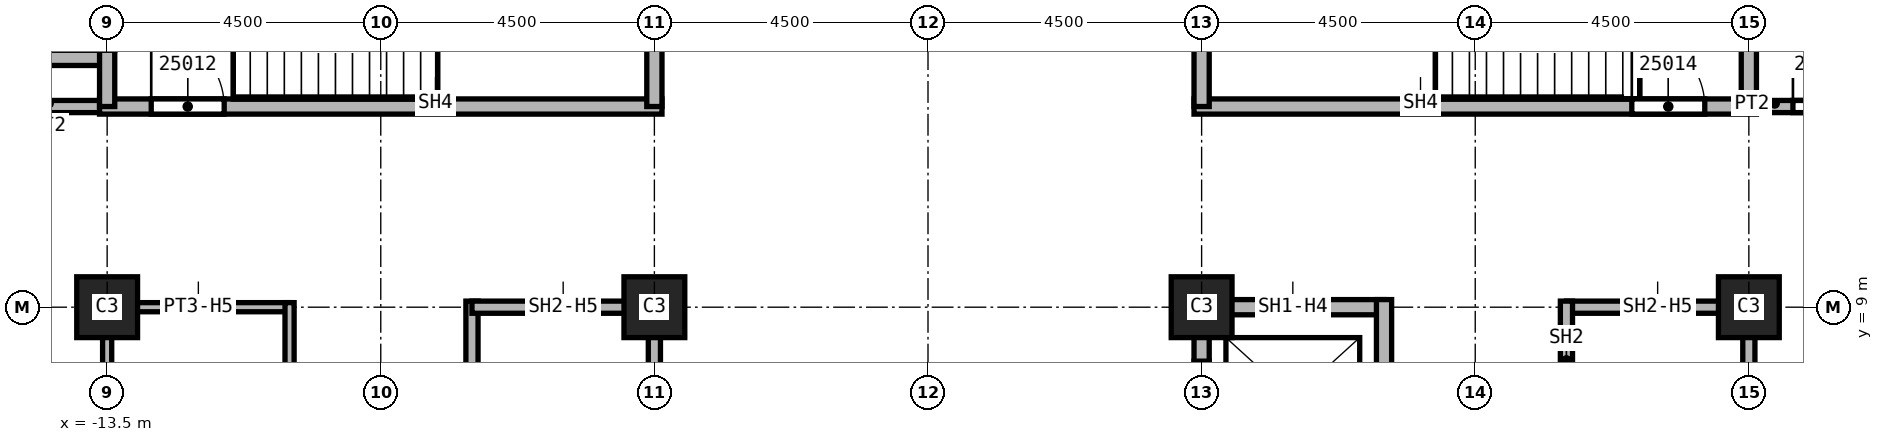
"""IFC4 building model, lengths in metres.
Left out: names, types, materials, properties, quantities, classifications, styles, units other than length and angle.
Written with IfcOpenShell. Run it as: python <this file> out.ifc"""

import sys

from ifc_helpers import new_model, si_unit, direction, frame, frame_2d, origin, origin_2d, place, context, subcontext, project, spatial, rectangle, extrude, element, fill, save


model = new_model("IFC4")
c1 = context("Model", 3, precision=1e-05, world=origin(), true_north=direction((0.0, 1.0)))
c2 = subcontext(c1, "Body", "Model", "MODEL_VIEW")
j1 = project(units=[si_unit("LENGTHUNIT", "METRE"), si_unit("PLANEANGLEUNIT", "RADIAN")], contexts=[c1])
p1 = place(None, origin())
s1 = spatial("IfcSite", under=j1, at=p1, CompositionType="ELEMENT")
p2 = place(p1, origin())
s2 = spatial("IfcBuilding", under=s1, at=p2, CompositionType="ELEMENT")
p3 = place(p2, frame((0.0, 0.0, 60.0)))
s3 = spatial("IfcBuildingStorey", under=s2, at=p3, CompositionType="ELEMENT", Elevation=60.0)
for number, where, z_axis, x_axis in (
    (1, (4.5, 9.0, 0.0), (0.0, 0.0, 1.0), (1.0, 0.0, 0.0)),
    (2, (13.5, 9.0, 0.0), (0.0, 0.0, 1.0), (1.0, 0.0, 0.0)),
    (3, (-4.5, 9.0, 0.0), (0.0, 0.0, 1.0), (1.0, 0.0, 0.0)),
    (4, (-13.5, 9.0, 0.0), (0.0, 0.0, 1.0), (1.0, 0.0, 0.0)),
):
    element("IfcColumn", number, at=place(p3, frame(where, z_axis=z_axis, x_axis=x_axis)), inside=s3, PredefinedType="COLUMN", context=c2, shape_type="SweptSolid", body=[
        extrude(rectangle(XDim=1.0, YDim=1.0, at=origin_2d()), origin(), (0.0, 0.0, 1.0), 7.7),
    ])
p4 = place(p3, frame((-15.4, 12.3, 0.0), z_axis=(0.0, 0.0, 1.0), x_axis=(1.0, 0.0, 0.0)))
e5 = element("IfcWall", 5, at=p4, inside=s3, PredefinedType="PARTITIONING", context=c2, shape_type="SweptSolid", body=[
    extrude(rectangle(XDim=2.025, YDim=0.2, at=frame_2d((1.012, 0.0))), origin(), (0.0, 0.0, 1.0), 7.7),
])
p5 = place(p3, frame((13.375, 12.3, 0.0), z_axis=(0.0, 0.0, 1.0), x_axis=(1.0, 0.0, 0.0)))
e6 = element("IfcWall", 6, at=p5, inside=s3, PredefinedType="PARTITIONING", context=c2, shape_type="SweptSolid", body=[
    extrude(rectangle(XDim=2.125, YDim=0.2, at=frame_2d((1.062, 0.0))), origin(), (0.0, 0.0, 1.0), 7.7),
])
p6 = place(p5, frame((0.85, 0.0, 0.0)))
e7 = element("IfcOpeningElement", 7, at=p6, cuts=e6, PredefinedType="OPENING", context=c2, shape_type="SweptSolid", body=[
    extrude(rectangle(XDim=1.0, YDim=2.1, at=frame_2d((0.5, 1.05))), frame((0.0, 0.1, 0.0), z_axis=(0.0, -1.0, 0.0), x_axis=(1.0, 0.0, 0.0)), (0.0, 0.0, 1.0), 0.2),
])
p7 = place(p3, frame((-7.5, 2.875, 0.0), z_axis=(0.0, 0.0, 1.0), x_axis=(0.0, 1.0, 0.0)))
e8 = element("IfcWall", 8, at=p7, inside=s3, PredefinedType="SOLIDWALL", context=c2, shape_type="SweptSolid", body=[
    extrude(rectangle(XDim=6.225, YDim=0.2, at=frame_2d((3.113, 0.0))), origin(), (0.0, 0.0, 1.0), 7.7),
])
p8 = place(p3, frame((-7.5, 9.0, 0.0), z_axis=(0.0, 0.0, 1.0), x_axis=(1.0, 0.0, 0.0)))
e9 = element("IfcWall", 9, at=p8, inside=s3, PredefinedType="SOLIDWALL", context=c2, shape_type="SweptSolid", body=[
    extrude(rectangle(XDim=3.0, YDim=0.2, at=frame_2d((1.5, 0.0))), origin(), (0.0, 0.0, 1.0), 6.938),
])
p9 = place(p3, frame((-4.5, 9.1, 0.0), z_axis=(0.0, 0.0, 1.0), x_axis=(0.0, -1.0, 0.0)))
e10 = element("IfcWall", 10, at=p9, inside=s3, PredefinedType="SOLIDWALL", context=c2, shape_type="SweptSolid", body=[
    extrude(rectangle(XDim=9.1, YDim=0.2, at=frame_2d((4.55, 0.0))), origin(), (0.0, 0.0, 1.0), 6.938),
])
p10 = place(p9, frame((4.9, 0.0, 0.0)))
e11 = element("IfcOpeningElement", 11, at=p10, cuts=e10, PredefinedType="OPENING", context=c2, shape_type="SweptSolid", body=[
    extrude(rectangle(XDim=1.1, YDim=2.1, at=frame_2d((0.55, 1.05))), frame((0.0, 0.1, 0.0), z_axis=(0.0, -1.0, 0.0), x_axis=(1.0, 0.0, 0.0)), (0.0, 0.0, 1.0), 0.2),
])
p11 = place(p3, frame((10.5, 9.0, 0.0), z_axis=(0.0, 0.0, 1.0), x_axis=(1.0, 0.0, 0.0)))
e12 = element("IfcWall", 12, at=p11, inside=s3, PredefinedType="SOLIDWALL", context=c2, shape_type="SweptSolid", body=[
    extrude(rectangle(XDim=3.0, YDim=0.2, at=frame_2d((1.5, 0.0))), origin(), (0.0, 0.0, 1.0), 6.938),
])
p12 = place(p3, frame((10.5, 9.1, 0.0), z_axis=(0.0, 0.0, 1.0), x_axis=(0.0, -1.0, 0.0)))
e13 = element("IfcWall", 13, at=p12, inside=s3, PredefinedType="SOLIDWALL", context=c2, shape_type="SweptSolid", body=[
    extrude(rectangle(XDim=3.225, YDim=0.2, at=frame_2d((1.613, 0.0))), origin(), (0.0, 0.0, 1.0), 7.7),
])
p13 = place(p12, frame((1.75, 0.0, 0.0)))
e14 = element("IfcOpeningElement", 14, at=p13, cuts=e13, PredefinedType="OPENING", context=c2, shape_type="SweptSolid", body=[
    extrude(rectangle(XDim=1.1, YDim=2.1, at=frame_2d((0.55, 1.05))), frame((0.0, 0.1, 0.0), z_axis=(0.0, -1.0, 0.0), x_axis=(1.0, 0.0, 0.0)), (0.0, 0.0, 1.0), 0.2),
])
p14 = place(p3, frame((13.5, 9.1, 0.0), z_axis=(0.0, 0.0, 1.0), x_axis=(0.0, -1.0, 0.0)))
e15 = element("IfcWall", 15, at=p14, inside=s3, PredefinedType="SOLIDWALL", context=c2, shape_type="SweptSolid", body=[
    extrude(rectangle(XDim=3.1, YDim=0.2, at=frame_2d((1.55, 0.0))), origin(), (0.0, 0.0, 1.0), 6.938),
])
p15 = place(p3, frame((-13.5, 13.1, 0.0), z_axis=(0.0, 0.0, 1.0), x_axis=(-1.0, 0.0, 0.0)))
e16 = element("IfcWall", 16, at=p15, inside=s3, PredefinedType="SOLIDWALL", context=c2, shape_type="SweptSolid", body=[
    extrude(rectangle(XDim=24.025, YDim=0.25, at=frame_2d((12.012, 0.0))), origin(), (0.0, 0.0, 1.0), 7.7),
])
p16 = place(p3, frame((4.5, 0.0, 0.0), z_axis=(0.0, 0.0, 1.0), x_axis=(0.0, 1.0, 0.0)))
e17 = element("IfcWall", 17, at=p16, inside=s3, PredefinedType="SOLIDWALL", context=c2, shape_type="SweptSolid", body=[
    extrude(rectangle(XDim=9.125, YDim=0.25, at=frame_2d((4.562, 0.0))), origin(), (0.0, 0.0, 1.0), 6.938),
])
p17 = place(p16, frame((0.95, 0.0, 0.0)))
e18 = element("IfcOpeningElement", 18, at=p17, cuts=e17, PredefinedType="OPENING", context=c2, shape_type="SweptSolid", body=[
    extrude(rectangle(XDim=1.1, YDim=2.1, at=frame_2d((0.55, 1.05))), frame((0.0, 0.125, 0.0), z_axis=(0.0, -1.0, 0.0), x_axis=(1.0, 0.0, 0.0)), (0.0, 0.0, 1.0), 0.25),
])
p18 = place(p16, frame((3.95, 0.0, 0.0)))
e19 = element("IfcOpeningElement", 19, at=p18, cuts=e17, PredefinedType="OPENING", context=c2, shape_type="SweptSolid", body=[
    extrude(rectangle(XDim=1.1, YDim=2.1, at=frame_2d((0.55, 1.05))), frame((0.0, 0.125, 0.0), z_axis=(0.0, -1.0, 0.0), x_axis=(1.0, 0.0, 0.0)), (0.0, 0.0, 1.0), 0.25),
])
p19 = place(p16, frame((7.012, 0.0, 0.0)))
e20 = element("IfcOpeningElement", 20, at=p19, cuts=e17, PredefinedType="OPENING", context=c2, shape_type="SweptSolid", body=[
    extrude(rectangle(XDim=1.1, YDim=2.1, at=frame_2d((0.55, 1.05))), frame((0.0, 0.125, 0.0), z_axis=(0.0, -1.0, 0.0), x_axis=(1.0, 0.0, 0.0)), (0.0, 0.0, 1.0), 0.25),
])
p20 = place(p3, frame((4.5, 9.0, 0.0), z_axis=(0.0, 0.0, 1.0), x_axis=(1.0, 0.0, 0.0)))
e21 = element("IfcWall", 21, at=p20, inside=s3, PredefinedType="SOLIDWALL", context=c2, shape_type="SweptSolid", body=[
    extrude(rectangle(XDim=3.0, YDim=0.25, at=frame_2d((1.5, 0.0))), origin(), (0.0, 0.0, 1.0), 6.938),
])
p21 = place(p3, frame((7.5, 9.125, 0.0), z_axis=(0.0, 0.0, 1.0), x_axis=(0.0, -1.0, 0.0)))
e22 = element("IfcWall", 22, at=p21, inside=s3, PredefinedType="SOLIDWALL", context=c2, shape_type="SweptSolid", body=[
    extrude(rectangle(XDim=12.25, YDim=0.25, at=frame_2d((6.125, 0.0))), origin(), (0.0, 0.0, 1.0), 7.7),
])
p22 = place(p3, frame((-13.625, 12.3, 0.0), z_axis=(0.0, 0.0, 1.0), x_axis=(1.0, 0.0, 0.0)))
e23 = element("IfcWall", 23, at=p22, inside=s3, PredefinedType="SOLIDWALL", context=c2, shape_type="SweptSolid", body=[
    extrude(rectangle(XDim=9.25, YDim=0.25, at=frame_2d((4.625, 0.0))), origin(), (0.0, 0.0, 1.0), 7.7),
])
p23 = place(p22, frame((0.85, 0.0, 0.0)))
e24 = element("IfcOpeningElement", 24, at=p23, cuts=e23, PredefinedType="OPENING", context=c2, shape_type="SweptSolid", body=[
    extrude(rectangle(XDim=1.2, YDim=2.1, at=frame_2d((0.6, 1.05))), frame((0.0, 0.125, 0.0), z_axis=(0.0, -1.0, 0.0), x_axis=(1.0, 0.0, 0.0)), (0.0, 0.0, 1.0), 0.25),
])
p24 = place(p3, frame((-13.5, 12.3, 0.0), z_axis=(0.0, 0.0, 1.0), x_axis=(0.0, 1.0, 0.0)))
e25 = element("IfcWall", 25, at=p24, inside=s3, PredefinedType="SOLIDWALL", context=c2, shape_type="SweptSolid", body=[
    extrude(rectangle(XDim=4.5, YDim=0.25, at=frame_2d((2.25, 0.0))), origin(), (0.0, 0.0, 1.0), 7.7),
])
p25 = place(p24, frame((0.925, 0.0, 0.0)))
e26 = element("IfcOpeningElement", 26, at=p25, cuts=e25, PredefinedType="OPENING", context=c2, shape_type="SweptSolid", body=[
    extrude(rectangle(XDim=1.8, YDim=2.1, at=frame_2d((0.9, 1.05))), frame((0.0, 0.125, 0.0), z_axis=(0.0, -1.0, 0.0), x_axis=(1.0, 0.0, 0.0)), (0.0, 0.0, 1.0), 0.25),
])
p26 = place(p3, frame((-4.5, 16.925, 0.0), z_axis=(0.0, 0.0, 1.0), x_axis=(0.0, -1.0, 0.0)))
e27 = element("IfcWall", 27, at=p26, inside=s3, PredefinedType="SOLIDWALL", context=c2, shape_type="SweptSolid", body=[
    extrude(rectangle(XDim=4.625, YDim=0.25, at=frame_2d((2.312, 0.0))), origin(), (0.0, 0.0, 1.0), 7.7),
])
p27 = place(p3, frame((4.375, 12.3, 0.0), z_axis=(0.0, 0.0, 1.0), x_axis=(1.0, 0.0, 0.0)))
e28 = element("IfcWall", 28, at=p27, inside=s3, PredefinedType="SOLIDWALL", context=c2, shape_type="SweptSolid", body=[
    extrude(rectangle(XDim=9.25, YDim=0.25, at=frame_2d((4.625, 0.0))), origin(), (0.0, 0.0, 1.0), 7.7),
])
p28 = place(p27, frame((7.2, 0.0, 0.0)))
e29 = element("IfcOpeningElement", 29, at=p28, cuts=e28, PredefinedType="OPENING", context=c2, shape_type="SweptSolid", body=[
    extrude(rectangle(XDim=1.2, YDim=2.1, at=frame_2d((0.6, 1.05))), frame((0.0, 0.125, 0.0), z_axis=(0.0, -1.0, 0.0), x_axis=(1.0, 0.0, 0.0)), (0.0, 0.0, 1.0), 0.25),
])
p29 = place(p3, frame((4.5, 12.3, 0.0), z_axis=(0.0, 0.0, 1.0), x_axis=(0.0, 1.0, 0.0)))
e30 = element("IfcWall", 30, at=p29, inside=s3, PredefinedType="SOLIDWALL", context=c2, shape_type="SweptSolid", body=[
    extrude(rectangle(XDim=4.5, YDim=0.25, at=frame_2d((2.25, 0.0))), origin(), (0.0, 0.0, 1.0), 7.7),
])
p30 = place(p3, frame((13.5, 16.925, 0.0), z_axis=(0.0, 0.0, 1.0), x_axis=(0.0, -1.0, 0.0)))
e31 = element("IfcWall", 31, at=p30, inside=s3, PredefinedType="SOLIDWALL", context=c2, shape_type="SweptSolid", body=[
    extrude(rectangle(XDim=4.625, YDim=0.25, at=frame_2d((2.312, 0.0))), origin(), (0.0, 0.0, 1.0), 7.7),
])
p31 = place(p3, frame((-13.5, 3.0, 0.0), z_axis=(0.0, 0.0, 1.0), x_axis=(0.0, 1.0, 0.0)))
e32 = element("IfcWall", 32, at=p31, inside=s3, PredefinedType="PARTITIONING", context=c2, shape_type="SweptSolid", body=[
    extrude(rectangle(XDim=6.075, YDim=0.15, at=frame_2d((3.038, 0.0))), origin(), (0.0, 0.0, 1.0), 6.938),
])
p32 = place(p3, frame((-13.5, 9.0, 0.0), z_axis=(0.0, 0.0, 1.0), x_axis=(1.0, 0.0, 0.0)))
e33 = element("IfcWall", 33, at=p32, inside=s3, PredefinedType="PARTITIONING", context=c2, shape_type="SweptSolid", body=[
    extrude(rectangle(XDim=3.0, YDim=0.15, at=frame_2d((1.5, 0.0))), origin(), (0.0, 0.0, 1.0), 6.938),
])
p33 = place(p3, frame((-10.5, 2.875, 0.0), z_axis=(0.0, 0.0, 1.0), x_axis=(0.0, 1.0, 0.0)))
e34 = element("IfcWall", 34, at=p33, inside=s3, PredefinedType="PARTITIONING", context=c2, shape_type="SweptSolid", body=[
    extrude(rectangle(XDim=6.2, YDim=0.15, at=frame_2d((3.1, 0.0))), origin(), (0.0, 0.0, 1.0), 7.7),
])
p34 = place(p33, frame((3.55, 0.0, 0.0)))
e35 = element("IfcOpeningElement", 35, at=p34, cuts=e34, PredefinedType="OPENING", context=c2, shape_type="SweptSolid", body=[
    extrude(rectangle(XDim=0.9, YDim=2.1, at=frame_2d((0.45, 1.05))), frame((0.0, 0.075, 0.0), z_axis=(0.0, -1.0, 0.0), x_axis=(1.0, 0.0, 0.0)), (0.0, 0.0, 1.0), 0.15),
])
p35 = place(p23, origin())
e36 = element("IfcDoor", 36, at=p35, inside=s3, OperationType="SINGLE_SWING_LEFT", PredefinedType="DOOR", context=c2, shape_type="SweptSolid", body=[
    extrude(rectangle(XDim=1.2, YDim=2.1, at=frame_2d((0.6, 1.05))), frame((0.0, 0.025, 0.0), z_axis=(0.0, -1.0, 0.0), x_axis=(1.0, 0.0, 0.0)), (0.0, 0.0, 1.0), 0.05),
])
fill(e24, e36)
p36 = place(p28, origin())
e37 = element("IfcDoor", 37, at=p36, inside=s3, OperationType="SINGLE_SWING_LEFT", PredefinedType="DOOR", context=c2, shape_type="SweptSolid", body=[
    extrude(rectangle(XDim=1.2, YDim=2.1, at=frame_2d((0.6, 1.05))), frame((0.0, 0.025, 0.0), z_axis=(0.0, -1.0, 0.0), x_axis=(1.0, 0.0, 0.0)), (0.0, 0.0, 1.0), 0.05),
])
fill(e29, e37)
p37 = place(p6, origin())
e38 = element("IfcDoor", 38, at=p37, inside=s3, OperationType="SINGLE_SWING_LEFT", PredefinedType="DOOR", context=c2, shape_type="SweptSolid", body=[
    extrude(rectangle(XDim=1.0, YDim=2.1, at=frame_2d((0.5, 1.05))), frame((0.0, 0.025, 0.0), z_axis=(0.0, -1.0, 0.0), x_axis=(1.0, 0.0, 0.0)), (0.0, 0.0, 1.0), 0.05),
])
fill(e7, e38)
p38 = place(p19, origin())
e39 = element("IfcDoor", 39, at=p38, inside=s3, OperationType="SLIDING_TO_LEFT", PredefinedType="DOOR", context=c2, shape_type="SweptSolid", body=[
    extrude(rectangle(XDim=1.1, YDim=2.1, at=frame_2d((0.55, 1.05))), frame((0.0, 0.025, 0.0), z_axis=(0.0, -1.0, 0.0), x_axis=(1.0, 0.0, 0.0)), (0.0, 0.0, 1.0), 0.05),
])
fill(e20, e39)
save(model, sys.argv[1])
